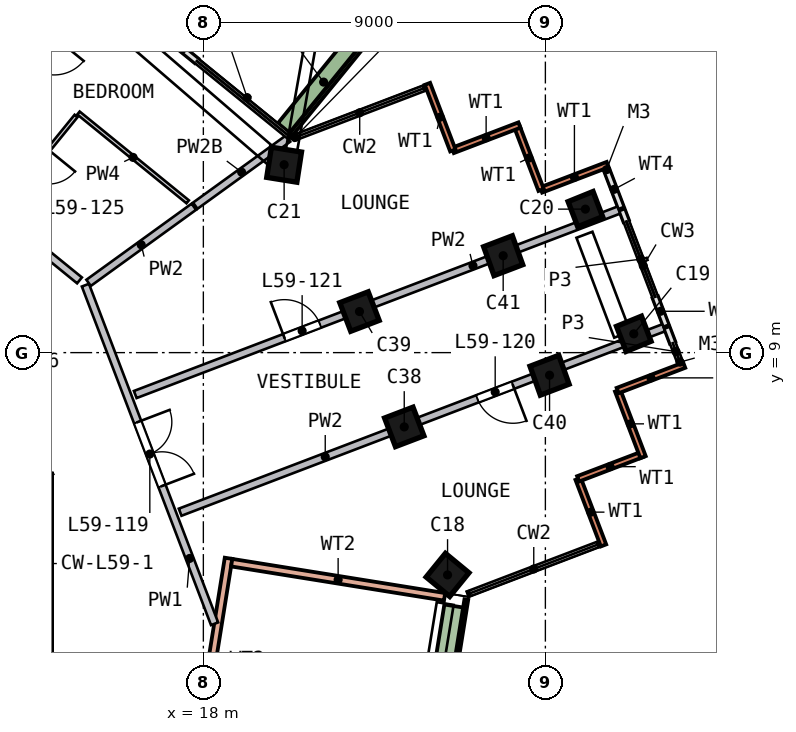
"""IFC4 building model, lengths in metres.
Left out: names, types, materials, properties, quantities, classifications, styles, units other than length and angle.
Written with IfcOpenShell. Run it as: python <this file> out.ifc"""

import sys

from ifc_helpers import new_model, si_unit, direction, frame, frame_2d, origin, origin_2d, place, context, subcontext, project, spatial, rectangle, extrude, element, fill, save


model = new_model("IFC4")
c1 = context("Model", 3, precision=1e-05, world=origin(), true_north=direction((0.0, 1.0)))
c2 = subcontext(c1, "Body", "Model", "MODEL_VIEW")
j1 = project(units=[si_unit("LENGTHUNIT", "METRE"), si_unit("PLANEANGLEUNIT", "RADIAN")], contexts=[c1])
p1 = place(None, origin())
s1 = spatial("IfcSite", under=j1, at=p1, CompositionType="ELEMENT")
p2 = place(p1, origin())
s2 = spatial("IfcBuilding", under=s1, at=p2, CompositionType="ELEMENT")
p3 = place(p2, frame((0.0, 0.0, 241.0)))
s3 = spatial("IfcBuildingStorey", under=s2, at=p3, CompositionType="ELEMENT", Elevation=241.0)
p4 = place(p3, frame((24.444, 3.01, 0.0), z_axis=(-0.015277664, 0.11606464, 0.993124158), x_axis=(-0.634242484, -0.768972433, 0.0801116)))
e1 = element("IfcColumn", 1, at=p4, inside=s3, PredefinedType="COLUMN", context=c2, shape_type="SweptSolid", body=[
    extrude(rectangle(XDim=0.8, YDim=0.8, at=origin_2d()), origin(), (0.0, 0.0, 1.0), 3.212),
])
p5 = place(p3, frame((29.209, 9.259, 0.0), z_axis=(0.095014741, 0.192122647, 0.976760507), x_axis=(-0.374327363, 0.916082858, -0.143774902)))
e2 = element("IfcColumn", 2, at=p5, inside=s3, PredefinedType="COLUMN", context=c2, shape_type="SweptSolid", body=[
    extrude(rectangle(XDim=0.7, YDim=0.7, at=origin_2d()), origin(), (0.0, 0.0, 1.0), 3.266),
])
p6 = place(p3, frame((27.955, 12.547, 0.0), z_axis=(0.07988733, 0.186603614, 0.979181855), x_axis=(-0.372145474, 0.91687811, -0.144368546)))
e3 = element("IfcColumn", 3, at=p6, inside=s3, PredefinedType="COLUMN", context=c2, shape_type="SweptSolid", body=[
    extrude(rectangle(XDim=0.7, YDim=0.7, at=origin_2d()), origin(), (0.0, 0.0, 1.0), 3.258),
])
p7 = place(p3, frame((20.206, 13.83, 0.0), z_axis=(-0.066512326, 0.095549708, 0.993200062), x_axis=(0.985129194, -0.151752375, 0.080571007)))
e4 = element("IfcColumn", 4, at=p7, inside=s3, PredefinedType="COLUMN", context=c2, shape_type="SweptSolid", body=[
    extrude(rectangle(XDim=0.8, YDim=0.8, at=origin_2d()), origin(), (0.0, 0.0, 1.0), 3.212),
])
for number, where, z_axis, x_axis in (
    (5, (23.327, 6.911, 0.0), (-0.034, 0.111, 0.993), (0.935, 0.355, -0.008)),
    (6, (22.166, 9.954, 0.0), (-0.048, 0.105, 0.993), (0.934, 0.357, 0.008)),
):
    element("IfcColumn", number, at=place(p3, frame(where, z_axis=z_axis, x_axis=x_axis)), inside=s3, PredefinedType="COLUMN", context=c2, shape_type="SweptSolid", body=[
        extrude(rectangle(XDim=0.8, YDim=0.8, at=origin_2d()), origin(), (0.0, 0.0, 1.0), 3.211),
    ])
p8 = place(p3, frame((26.987, 8.182, 0.0), z_axis=(0.100317355, 0.181993649, 0.978169075), x_axis=(0.930249588, 0.331595959, -0.157098134)))
e7 = element("IfcColumn", 7, at=p8, inside=s3, PredefinedType="COLUMN", context=c2, shape_type="SweptSolid", body=[
    extrude(rectangle(XDim=0.8, YDim=0.8, at=origin_2d()), origin(), (0.0, 0.0, 1.0), 3.261),
])
p9 = place(p3, frame((25.784, 11.334, 0.0), z_axis=(0.085848946, 0.176725759, 0.980509033), x_axis=(0.931706094, 0.334371646, -0.141842721)))
e8 = element("IfcColumn", 8, at=p9, inside=s3, PredefinedType="COLUMN", context=c2, shape_type="SweptSolid", body=[
    extrude(rectangle(XDim=0.8, YDim=0.8, at=origin_2d()), origin(), (0.0, 0.0, 1.0), 3.253),
])
p10 = place(p3, frame((28.53, 3.926, 0.0), z_axis=(0.0, 0.0, 1.0), x_axis=(-0.356368895, 0.934345338, 0.0)))
e9 = element("IfcWall", 9, at=p10, inside=s3, PredefinedType="SOLIDWALL", context=c2, shape_type="SweptSolid", body=[
    extrude(rectangle(XDim=1.875, YDim=0.15, at=frame_2d((0.938, 0.0))), origin(), (0.0, 0.0, 1.0), 3.19),
])
p11 = place(p3, frame((27.862, 5.678, 0.0), z_axis=(0.0, 0.0, 1.0), x_axis=(0.934352287, 0.356350676, 0.0)))
e10 = element("IfcWall", 10, at=p11, inside=s3, PredefinedType="SOLIDWALL", context=c2, shape_type="SweptSolid", body=[
    extrude(rectangle(XDim=1.8, YDim=0.15, at=frame_2d((0.9, 0.0))), origin(), (0.0, 0.0, 1.0), 3.19),
])
p12 = place(p3, frame((29.57, 6.25, 0.0), z_axis=(0.0, 0.0, 1.0), x_axis=(-0.356368895, 0.934345338, 0.0)))
e11 = element("IfcWall", 11, at=p12, inside=s3, PredefinedType="SOLIDWALL", context=c2, shape_type="SweptSolid", body=[
    extrude(rectangle(XDim=1.875, YDim=0.15, at=frame_2d((0.938, 0.0))), origin(), (0.0, 0.0, 1.0), 3.19),
])
p13 = place(p3, frame((28.902, 8.001, 0.0), z_axis=(0.0, 0.0, 1.0), x_axis=(0.934328799, 0.356412254, 0.0)))
e12 = element("IfcWall", 12, at=p13, inside=s3, PredefinedType="SOLIDWALL", context=c2, shape_type="SweptSolid", body=[
    extrude(rectangle(XDim=1.875, YDim=0.15, at=frame_2d((0.938, 0.0))), origin(), (0.0, 0.0, 1.0), 3.19),
])
p14 = place(p3, frame((28.64, 13.949, 0.0), z_axis=(0.0, 0.0, 1.0), x_axis=(-0.934345338, -0.356368895, 0.0)))
e13 = element("IfcWall", 13, at=p14, inside=s3, PredefinedType="SOLIDWALL", context=c2, shape_type="SweptSolid", body=[
    extrude(rectangle(XDim=1.875, YDim=0.15, at=frame_2d((0.938, 0.0))), origin(), (0.0, 0.0, 1.0), 3.19),
])
p15 = place(p3, frame((26.888, 13.281, 0.0), z_axis=(0.0, 0.0, 1.0), x_axis=(-0.356350676, 0.934352287, 0.0)))
e14 = element("IfcWall", 14, at=p15, inside=s3, PredefinedType="SOLIDWALL", context=c2, shape_type="SweptSolid", body=[
    extrude(rectangle(XDim=1.8, YDim=0.15, at=frame_2d((0.9, 0.0))), origin(), (0.0, 0.0, 1.0), 3.19),
])
p16 = place(p3, frame((26.317, 14.989, 0.0), z_axis=(0.0, 0.0, 1.0), x_axis=(-0.934345338, -0.356368895, 0.0)))
e15 = element("IfcWall", 15, at=p16, inside=s3, PredefinedType="SOLIDWALL", context=c2, shape_type="SweptSolid", body=[
    extrude(rectangle(XDim=1.875, YDim=0.15, at=frame_2d((0.938, 0.0))), origin(), (0.0, 0.0, 1.0), 3.19),
])
p17 = place(p3, frame((24.565, 14.321, 0.0), z_axis=(0.0, 0.0, 1.0), x_axis=(-0.356412254, 0.934328799, 0.0)))
e16 = element("IfcWall", 16, at=p17, inside=s3, PredefinedType="SOLIDWALL", context=c2, shape_type="SweptSolid", body=[
    extrude(rectangle(XDim=1.875, YDim=0.15, at=frame_2d((0.938, 0.0))), origin(), (0.0, 0.0, 1.0), 3.19),
])
p18 = place(p3, frame((30.347, 9.264, 0.0), z_axis=(0.0, 0.0, 1.0), x_axis=(-0.356244711, 0.934392694, 0.0)))
e17 = element("IfcWall", 17, at=p18, inside=s3, PredefinedType="SOLIDWALL", context=c2, shape_type="SweptSolid", body=[
    extrude(rectangle(XDim=0.407, YDim=0.15, at=frame_2d((0.204, 0.0))), origin(), (0.0, 0.0, 1.0), 2.525),
])
p19 = place(p3, frame((30.173, 9.719, 0.0), z_axis=(0.0, 0.0, 1.0), x_axis=(-0.356446014, 0.93431592, 0.0)))
e18 = element("IfcWall", 18, at=p19, inside=s3, PredefinedType="SOLIDWALL", context=c2, shape_type="SweptSolid", body=[
    extrude(rectangle(XDim=0.788, YDim=0.15, at=frame_2d((0.394, 0.0))), origin(), (0.0, 0.0, 1.0), 2.525),
])
p20 = place(p3, frame((29.127, 12.462, 0.0), z_axis=(0.0, 0.0, 1.0), x_axis=(-0.356469091, 0.934307116, 0.0)))
e19 = element("IfcWall", 19, at=p20, inside=s3, PredefinedType="SOLIDWALL", context=c2, shape_type="SweptSolid", body=[
    extrude(rectangle(XDim=0.3, YDim=0.15, at=frame_2d((0.15, 0.0))), origin(), (0.0, 0.0, 1.0), 2.525),
])
p21 = place(p3, frame((28.992, 12.817, 0.0), z_axis=(0.0, 0.0, 1.0), x_axis=(-0.356479204, 0.934303257, 0.0)))
e20 = element("IfcWall", 20, at=p21, inside=s3, PredefinedType="SOLIDWALL", context=c2, shape_type="SweptSolid", body=[
    extrude(rectangle(XDim=1.028, YDim=0.15, at=frame_2d((0.514, 0.0))), origin(), (0.0, 0.0, 1.0), 2.525),
])
p22 = place(p3, frame((17.819, 16.68, 0.0), z_axis=(0.0, 0.0, 1.0), x_axis=(-0.775849163, 0.630918438, 0.0)))
e21 = element("IfcWall", 21, at=p22, inside=s3, PredefinedType="SOLIDWALL", context=c2, shape_type="SweptSolid", body=[
    extrude(rectangle(XDim=3.3, YDim=0.15, at=frame_2d((1.65, 0.0))), origin(), (0.0, 0.0, 1.0), 2.525),
])
p23 = place(p22, frame((0.4, 0.0, 0.0)))
e22 = element("IfcOpeningElement", 22, at=p23, cuts=e21, PredefinedType="OPENING", context=c2, shape_type="SweptSolid", body=[
    extrude(rectangle(XDim=2.4, YDim=2.4, at=frame_2d((1.2, 1.2))), frame((0.0, 0.085, 0.0), z_axis=(0.0, -1.0, 0.0), x_axis=(1.0, 0.0, 0.0)), (0.0, 0.0, 1.0), 0.17),
])
p24 = place(p3, frame((20.155, 14.878, 0.0), z_axis=(0.0, 0.0, 1.0), x_axis=(0.630957466, 0.775817424, 0.0)))
e23 = element("IfcWall", 23, at=p24, inside=s3, PredefinedType="SOLIDWALL", context=c2, shape_type="SweptSolid", body=[
    extrude(rectangle(XDim=3.199, YDim=0.5, at=frame_2d((1.599, 0.0))), origin(), (0.0, 0.0, 1.0), 0.7),
])
p25 = place(p3, frame((18.663, 3.587, 0.0), z_axis=(0.0, 0.0, 1.0), x_axis=(-0.158503194, -0.987358464, 0.0)))
e24 = element("IfcWall", 24, at=p25, inside=s3, PredefinedType="SOLIDWALL", context=c2, shape_type="SweptSolid", body=[
    extrude(rectangle(XDim=13.0, YDim=0.2, at=frame_2d((6.5, 0.0))), origin(), (0.0, 0.0, 1.0), 3.19),
])
p26 = place(p25, frame((5.6, 0.0, 0.0)))
e25 = element("IfcOpeningElement", 25, at=p26, cuts=e24, PredefinedType="OPENING", context=c2, shape_type="SweptSolid", body=[
    extrude(rectangle(XDim=1.8, YDim=2.4, at=frame_2d((0.9, 1.2))), frame((0.0, 0.11, 0.0), z_axis=(0.0, -1.0, 0.0), x_axis=(1.0, 0.0, 0.0)), (0.0, 0.0, 1.0), 0.22),
])
p27 = place(p3, frame((24.347, 2.573, 0.0), z_axis=(0.0, 0.0, 1.0), x_axis=(-0.98735913, 0.158499049, 0.0)))
e26 = element("IfcWall", 26, at=p27, inside=s3, PredefinedType="SOLIDWALL", context=c2, shape_type="SweptSolid", body=[
    extrude(rectangle(XDim=5.673, YDim=0.2, at=frame_2d((2.836, 0.0))), origin(), (0.0, 0.0, 1.0), 3.19),
])
p28 = place(p3, frame((22.885, -10.176, 0.0), z_axis=(0.0, 0.0, 1.0), x_axis=(0.158500684, 0.987358867, 0.0)))
e27 = element("IfcWall", 27, at=p28, inside=s3, PredefinedType="SOLIDWALL", context=c2, shape_type="SweptSolid", body=[
    extrude(rectangle(XDim=12.84, YDim=0.1, at=frame_2d((6.42, 0.0))), origin(), (0.0, 0.0, 1.0), 0.7),
])
p29 = place(p3, frame((23.743, -2.939, 0.0), z_axis=(0.0, 0.0, 1.0), x_axis=(0.158500574, 0.987358885, 0.0)))
e28 = element("IfcWall", 28, at=p29, inside=s3, PredefinedType="SOLIDWALL", context=c2, shape_type="SweptSolid", body=[
    extrude(rectangle(XDim=5.339, YDim=0.5, at=frame_2d((2.669, 0.0))), origin(), (0.0, 0.0, 1.0), 0.7),
])
p30 = place(p3, frame((7.513, 16.78, 0.0), z_axis=(0.0, 0.0, 1.0), x_axis=(0.775830166, -0.630941799, 0.0)))
e29 = element("IfcWall", 29, at=p30, inside=s3, PredefinedType="SOLIDWALL", context=c2, shape_type="SweptSolid", body=[
    extrude(rectangle(XDim=9.316, YDim=0.2, at=frame_2d((4.658, 0.0))), origin(), (0.0, 0.0, 1.0), 3.19),
])
p31 = place(p30, frame((1.9, 0.0, 0.0)))
e30 = element("IfcOpeningElement", 30, at=p31, cuts=e29, PredefinedType="OPENING", context=c2, shape_type="SweptSolid", body=[
    extrude(rectangle(XDim=1.0, YDim=2.1, at=frame_2d((0.5, 1.05))), frame((0.0, 0.11, 0.0), z_axis=(0.0, -1.0, 0.0), x_axis=(1.0, 0.0, 0.0)), (0.0, 0.0, 1.0), 0.22),
])
p32 = place(p3, frame((14.896, 10.775, 0.0), z_axis=(0.0, 0.0, 1.0), x_axis=(0.356406215, -0.934331103, 0.0)))
e31 = element("IfcWall", 31, at=p32, inside=s3, PredefinedType="SOLIDWALL", context=c2, shape_type="SweptSolid", body=[
    extrude(rectangle(XDim=9.537, YDim=0.2, at=frame_2d((4.768, 0.0))), origin(), (0.0, 0.0, 1.0), 3.19),
])
p33 = place(p32, frame((3.856, 0.0, 0.0)))
e32 = element("IfcOpeningElement", 32, at=p33, cuts=e31, PredefinedType="OPENING", context=c2, shape_type="SweptSolid", body=[
    extrude(rectangle(XDim=1.8, YDim=2.1, at=frame_2d((0.9, 1.05))), frame((0.0, 0.11, 0.0), z_axis=(0.0, -1.0, 0.0), x_axis=(1.0, 0.0, 0.0)), (0.0, 0.0, 1.0), 0.22),
])
p34 = place(p3, frame((14.98, 10.836, 0.0), z_axis=(0.0, 0.0, 1.0), x_axis=(0.810225132, 0.586118789, 0.0)))
e33 = element("IfcWall", 33, at=p34, inside=s3, PredefinedType="SOLIDWALL", context=c2, shape_type="SweptSolid", body=[
    extrude(rectangle(XDim=3.418, YDim=0.2, at=frame_2d((1.709, 0.0))), origin(), (0.0, 0.0, 1.0), 3.19),
])
p35 = place(p3, frame((17.787, 12.866, 0.0), z_axis=(0.0, 0.0, 1.0), x_axis=(0.810251443, 0.586082417, 0.0)))
e34 = element("IfcWall", 34, at=p35, inside=s3, PredefinedType="SOLIDWALL", context=c2, shape_type="SweptSolid", body=[
    extrude(rectangle(XDim=3.011, YDim=0.2, at=frame_2d((1.506, 0.0))), origin(), (0.0, 0.0, 1.0), 2.69),
])
p36 = place(p3, frame((16.208, 7.897, 0.0), z_axis=(0.0, 0.0, 1.0), x_axis=(0.934327798, 0.35641488, 0.0)))
e35 = element("IfcWall", 35, at=p36, inside=s3, PredefinedType="SOLIDWALL", context=c2, shape_type="SweptSolid", body=[
    extrude(rectangle(XDim=13.622, YDim=0.2, at=frame_2d((6.811, 0.0))), origin(), (0.0, 0.0, 1.0), 3.19),
])
p37 = place(p36, frame((4.2, 0.0, 0.0)))
e36 = element("IfcOpeningElement", 36, at=p37, cuts=e35, PredefinedType="OPENING", context=c2, shape_type="SweptSolid", body=[
    extrude(rectangle(XDim=1.0, YDim=2.1, at=frame_2d((0.5, 1.05))), frame((0.0, 0.11, 0.0), z_axis=(0.0, -1.0, 0.0), x_axis=(1.0, 0.0, 0.0)), (0.0, 0.0, 1.0), 0.22),
])
p38 = place(p3, frame((30.117, 9.656, 0.0), z_axis=(0.0, 0.0, 1.0), x_axis=(-0.934327798, -0.35641488, 0.0)))
e37 = element("IfcWall", 37, at=p38, inside=s3, PredefinedType="SOLIDWALL", context=c2, shape_type="SweptSolid", body=[
    extrude(rectangle(XDim=13.622, YDim=0.2, at=frame_2d((6.811, 0.0))), origin(), (0.0, 0.0, 1.0), 3.19),
])
p39 = place(p38, frame((4.25, 0.0, 0.0)))
e38 = element("IfcOpeningElement", 38, at=p39, cuts=e37, PredefinedType="OPENING", context=c2, shape_type="SweptSolid", body=[
    extrude(rectangle(XDim=1.0, YDim=2.1, at=frame_2d((0.5, 1.05))), frame((0.0, 0.11, 0.0), z_axis=(0.0, -1.0, 0.0), x_axis=(1.0, 0.0, 0.0)), (0.0, 0.0, 1.0), 0.22),
])
p40 = place(p3, frame((15.211, 18.704, 0.0), z_axis=(0.0, 0.0, 1.0), x_axis=(-0.63095871, -0.775816413, 0.0)))
e39 = element("IfcWall", 39, at=p40, inside=s3, PredefinedType="PARTITIONING", context=c2, shape_type="SweptSolid", body=[
    extrude(rectangle(XDim=6.15, YDim=0.1, at=frame_2d((3.075, 0.0))), origin(), (0.0, 0.0, 1.0), 3.19),
])
p41 = place(p40, frame((1.8, 0.0, 0.0)))
e40 = element("IfcOpeningElement", 40, at=p41, cuts=e39, PredefinedType="OPENING", context=c2, shape_type="SweptSolid", body=[
    extrude(rectangle(XDim=1.0, YDim=2.1, at=frame_2d((0.5, 1.05))), frame((0.0, 0.06, 0.0), z_axis=(0.0, -1.0, 0.0), x_axis=(1.0, 0.0, 0.0)), (0.0, 0.0, 1.0), 0.12),
])
p42 = place(p3, frame((14.651, 15.228, 0.0), z_axis=(0.0, 0.0, 1.0), x_axis=(-0.630936464, -0.775834504, 0.0)))
e41 = element("IfcWall", 41, at=p42, inside=s3, PredefinedType="PARTITIONING", context=c2, shape_type="SweptSolid", body=[
    extrude(rectangle(XDim=3.1, YDim=0.1, at=frame_2d((1.55, 0.0))), origin(), (0.0, 0.0, 1.0), 3.19),
])
p43 = place(p42, frame((1.15, 0.0, 0.0)))
e42 = element("IfcOpeningElement", 42, at=p43, cuts=e41, PredefinedType="OPENING", context=c2, shape_type="SweptSolid", body=[
    extrude(rectangle(XDim=0.9, YDim=2.1, at=frame_2d((0.45, 1.05))), frame((0.0, 0.06, 0.0), z_axis=(0.0, -1.0, 0.0), x_axis=(1.0, 0.0, 0.0)), (0.0, 0.0, 1.0), 0.12),
])
p44 = place(p3, frame((17.588, 12.969, 0.0), z_axis=(0.0, 0.0, 1.0), x_axis=(-0.775821588, 0.630952346, 0.0)))
e43 = element("IfcWall", 43, at=p44, inside=s3, PredefinedType="PARTITIONING", context=c2, shape_type="SweptSolid", body=[
    extrude(rectangle(XDim=3.704, YDim=0.1, at=frame_2d((1.852, 0.0))), origin(), (0.0, 0.0, 1.0), 3.19),
])
p45 = place(p33, origin())
e44 = element("IfcDoor", 44, at=p45, inside=s3, OperationType="DOUBLE_DOOR_SINGLE_SWING", PredefinedType="DOOR", context=c2, shape_type="SweptSolid", body=[
    extrude(rectangle(XDim=1.8, YDim=2.1, at=frame_2d((0.9, 1.05))), frame((0.0, 0.025, 0.0), z_axis=(0.0, -1.0, 0.0), x_axis=(1.0, 0.0, 0.0)), (0.0, 0.0, 1.0), 0.05),
])
fill(e32, e44)
p46 = place(p39, origin())
e45 = element("IfcDoor", 45, at=p46, inside=s3, OperationType="SINGLE_SWING_LEFT", PredefinedType="DOOR", context=c2, shape_type="SweptSolid", body=[
    extrude(rectangle(XDim=1.0, YDim=2.1, at=frame_2d((0.5, 1.05))), frame((0.0, 0.025, 0.0), z_axis=(0.0, -1.0, 0.0), x_axis=(1.0, 0.0, 0.0)), (0.0, 0.0, 1.0), 0.05),
])
fill(e38, e45)
p47 = place(p37, origin())
e46 = element("IfcDoor", 46, at=p47, inside=s3, OperationType="SINGLE_SWING_LEFT", PredefinedType="DOOR", context=c2, shape_type="SweptSolid", body=[
    extrude(rectangle(XDim=1.0, YDim=2.1, at=frame_2d((0.5, 1.05))), frame((0.0, 0.025, 0.0), z_axis=(0.0, -1.0, 0.0), x_axis=(1.0, 0.0, 0.0)), (0.0, 0.0, 1.0), 0.05),
])
fill(e36, e46)
p48 = place(p41, origin())
e47 = element("IfcDoor", 47, at=p48, inside=s3, OperationType="SINGLE_SWING_LEFT", PredefinedType="DOOR", context=c2, shape_type="SweptSolid", body=[
    extrude(rectangle(XDim=1.0, YDim=2.1, at=frame_2d((0.5, 1.05))), frame((0.0, 0.025, 0.0), z_axis=(0.0, -1.0, 0.0), x_axis=(1.0, 0.0, 0.0)), (0.0, 0.0, 1.0), 0.05),
])
fill(e40, e47)
save(model, sys.argv[1])
